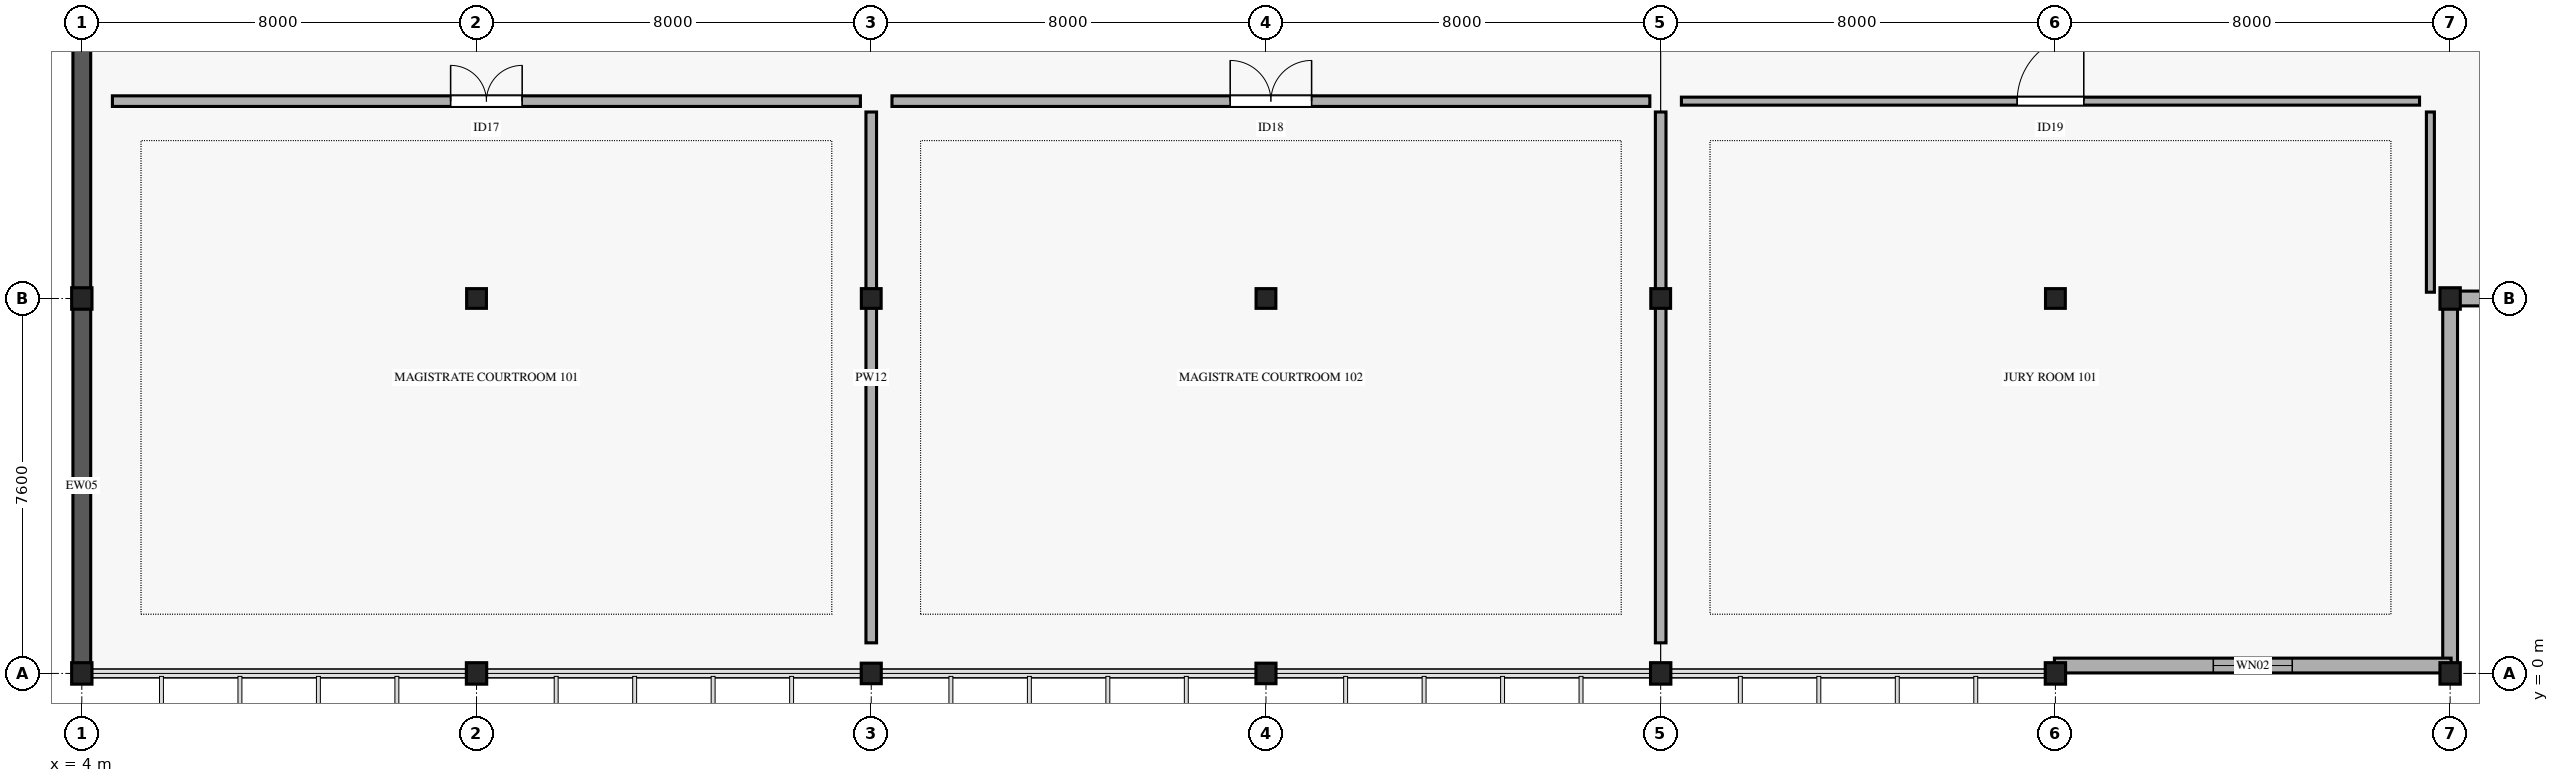
"""IFC4 building model, lengths in metres.
Left out: names, types, materials, properties, quantities, classifications, styles, units other than length and angle.
Written with IfcOpenShell. Run it as: python <this file> out.ifc"""

import sys

from ifc_helpers import new_model, si_unit, direction, frame, frame_2d, origin, origin_2d, place, context, subcontext, project, spatial, rectangle, i_section, extrude, element, fill, save


model = new_model("IFC4")
c1 = context("Model", 3, precision=1e-05, world=origin(), true_north=direction((0.0, 1.0)))
c2 = subcontext(c1, "Body", "Model", "MODEL_VIEW")
j1 = project(units=[si_unit("LENGTHUNIT", "METRE"), si_unit("PLANEANGLEUNIT", "RADIAN")], contexts=[c1])
p1 = place(None, origin())
s1 = spatial("IfcSite", under=j1, at=p1, CompositionType="ELEMENT")
p2 = place(p1, origin())
s2 = spatial("IfcBuilding", under=s1, at=p2, CompositionType="ELEMENT")
p3 = place(p2, frame((0.0, 0.0, 5.4)))
s3 = spatial("IfcBuildingStorey", under=s2, at=p3, CompositionType="ELEMENT", Elevation=5.4)
for number, where, z_axis, x_axis in (
    (1, (4.0, 0.0, 0.0), (0.0, 0.0, 1.0), (1.0, 0.0, 0.0)),
    (2, (4.0, 7.6, 0.0), (0.0, 0.0, 1.0), (1.0, 0.0, 0.0)),
    (3, (12.0, 0.0, 0.0), (0.0, 0.0, 1.0), (1.0, 0.0, 0.0)),
):
    element("IfcColumn", number, at=place(p3, frame(where, z_axis=z_axis, x_axis=x_axis)), inside=s3, PredefinedType="COLUMN", context=c2, shape_type="SweptSolid", body=[
        extrude(i_section(OverallWidth=0.412, OverallDepth=0.435, WebThickness=0.036, FlangeThickness=0.057, FilletRadius=0.015, at=origin_2d()), origin(), (0.0, 0.0, 1.0), 5.185),
    ])
p4 = place(p3, frame((12.0, 7.6, 0.0), z_axis=(0.0, 0.0, 1.0), x_axis=(1.0, 0.0, 0.0)))
e4 = element("IfcColumn", 4, at=p4, inside=s3, PredefinedType="COLUMN", context=c2, shape_type="SweptSolid", body=[
    extrude(i_section(OverallWidth=0.401, OverallDepth=0.399, WebThickness=0.025, FlangeThickness=0.04, FilletRadius=0.015, at=origin_2d()), origin(), (0.0, 0.0, 1.0), 5.185),
])
p5 = place(p3, frame((20.0, 0.0, 0.0), z_axis=(0.0, 0.0, 1.0), x_axis=(1.0, 0.0, 0.0)))
e5 = element("IfcColumn", 5, at=p5, inside=s3, PredefinedType="COLUMN", context=c2, shape_type="SweptSolid", body=[
    extrude(i_section(OverallWidth=0.406, OverallDepth=0.416, WebThickness=0.03, FlangeThickness=0.048, FilletRadius=0.015, at=origin_2d()), origin(), (0.0, 0.0, 1.0), 5.185),
])
p6 = place(p3, frame((20.0, 7.6, 0.0), z_axis=(0.0, 0.0, 1.0), x_axis=(1.0, 0.0, 0.0)))
e6 = element("IfcColumn", 6, at=p6, inside=s3, PredefinedType="COLUMN", context=c2, shape_type="SweptSolid", body=[
    extrude(i_section(OverallWidth=0.401, OverallDepth=0.399, WebThickness=0.025, FlangeThickness=0.04, FilletRadius=0.015, at=origin_2d()), origin(), (0.0, 0.0, 1.0), 5.185),
])
p7 = place(p3, frame((28.0, 0.0, 0.0), z_axis=(0.0, 0.0, 1.0), x_axis=(1.0, 0.0, 0.0)))
e7 = element("IfcColumn", 7, at=p7, inside=s3, PredefinedType="COLUMN", context=c2, shape_type="SweptSolid", body=[
    extrude(i_section(OverallWidth=0.406, OverallDepth=0.416, WebThickness=0.03, FlangeThickness=0.048, FilletRadius=0.015, at=origin_2d()), origin(), (0.0, 0.0, 1.0), 5.185),
])
p8 = place(p3, frame((28.0, 7.6, 0.0), z_axis=(0.0, 0.0, 1.0), x_axis=(1.0, 0.0, 0.0)))
e8 = element("IfcColumn", 8, at=p8, inside=s3, PredefinedType="COLUMN", context=c2, shape_type="SweptSolid", body=[
    extrude(i_section(OverallWidth=0.401, OverallDepth=0.399, WebThickness=0.025, FlangeThickness=0.04, FilletRadius=0.015, at=origin_2d()), origin(), (0.0, 0.0, 1.0), 5.185),
])
p9 = place(p3, frame((36.0, 0.0, 0.0), z_axis=(0.0, 0.0, 1.0), x_axis=(1.0, 0.0, 0.0)))
e9 = element("IfcColumn", 9, at=p9, inside=s3, PredefinedType="COLUMN", context=c2, shape_type="SweptSolid", body=[
    extrude(i_section(OverallWidth=0.412, OverallDepth=0.435, WebThickness=0.036, FlangeThickness=0.057, FilletRadius=0.015, at=origin_2d()), origin(), (0.0, 0.0, 1.0), 5.185),
])
p10 = place(p3, frame((36.0, 7.6, 0.0), z_axis=(0.0, 0.0, 1.0), x_axis=(1.0, 0.0, 0.0)))
e10 = element("IfcColumn", 10, at=p10, inside=s3, PredefinedType="COLUMN", context=c2, shape_type="SweptSolid", body=[
    extrude(i_section(OverallWidth=0.401, OverallDepth=0.399, WebThickness=0.025, FlangeThickness=0.04, FilletRadius=0.015, at=origin_2d()), origin(), (0.0, 0.0, 1.0), 5.185),
])
p11 = place(p3, frame((44.0, 0.0, 0.0), z_axis=(0.0, 0.0, 1.0), x_axis=(1.0, 0.0, 0.0)))
e11 = element("IfcColumn", 11, at=p11, inside=s3, PredefinedType="COLUMN", context=c2, shape_type="SweptSolid", body=[
    extrude(i_section(OverallWidth=0.412, OverallDepth=0.435, WebThickness=0.036, FlangeThickness=0.057, FilletRadius=0.015, at=origin_2d()), origin(), (0.0, 0.0, 1.0), 5.185),
])
p12 = place(p3, frame((44.0, 7.6, 0.0), z_axis=(0.0, 0.0, 1.0), x_axis=(1.0, 0.0, 0.0)))
e12 = element("IfcColumn", 12, at=p12, inside=s3, PredefinedType="COLUMN", context=c2, shape_type="SweptSolid", body=[
    extrude(i_section(OverallWidth=0.401, OverallDepth=0.399, WebThickness=0.025, FlangeThickness=0.04, FilletRadius=0.015, at=origin_2d()), origin(), (0.0, 0.0, 1.0), 5.185),
])
for number, where, z_axis, x_axis in (
    (13, (52.0, 0.0, 0.0), (0.0, 0.0, 1.0), (1.0, 0.0, 0.0)),
    (14, (52.0, 7.6, 0.0), (0.0, 0.0, 1.0), (1.0, 0.0, 0.0)),
):
    element("IfcColumn", number, at=place(p3, frame(where, z_axis=z_axis, x_axis=x_axis)), inside=s3, PredefinedType="COLUMN", context=c2, shape_type="SweptSolid", body=[
        extrude(i_section(OverallWidth=0.412, OverallDepth=0.435, WebThickness=0.036, FlangeThickness=0.057, FilletRadius=0.015, at=origin_2d()), origin(), (0.0, 0.0, 1.0), 5.185),
    ])
p13 = place(p3, frame((4.0, -0.02, 0.0), z_axis=(0.0, 0.0, 1.0), x_axis=(0.0, 1.0, 0.0)))
e15 = element("IfcWall", 15, at=p13, inside=s3, PredefinedType="STANDARD", context=c2, shape_type="SweptSolid", body=[
    extrude(rectangle(XDim=7.64, YDim=0.36, at=frame_2d((3.82, 0.0))), origin(), (0.0, 0.0, 1.0), 5.19),
])
p14 = place(p3, frame((4.0, 7.58, 0.0), z_axis=(0.0, 0.0, 1.0), x_axis=(0.0, 1.0, 0.0)))
e16 = element("IfcWall", 16, at=p14, inside=s3, PredefinedType="STANDARD", context=c2, shape_type="SweptSolid", body=[
    extrude(rectangle(XDim=7.64, YDim=0.36, at=frame_2d((3.82, 0.0))), origin(), (0.0, 0.0, 1.0), 5.19),
])
p15 = place(p3, frame((60.02, 7.6, 0.0), z_axis=(0.0, 0.0, 1.0), x_axis=(-1.0, 0.0, 0.0)))
e17 = element("IfcWall", 17, at=p15, inside=s3, PredefinedType="STANDARD", context=c2, shape_type="SweptSolid", body=[
    extrude(rectangle(XDim=8.04, YDim=0.3, at=frame_2d((4.02, 0.0))), origin(), (0.0, 0.0, 1.0), 4.25),
])
p16 = place(p3, frame((52.0, 7.62, 0.0), z_axis=(0.0, 0.0, 1.0), x_axis=(0.0, -1.0, 0.0)))
e18 = element("IfcWall", 18, at=p16, inside=s3, PredefinedType="STANDARD", context=c2, shape_type="SweptSolid", body=[
    extrude(rectangle(XDim=7.64, YDim=0.3, at=frame_2d((3.82, 0.0))), origin(), (0.0, 0.0, 1.0), 4.25),
])
p17 = place(p3, frame((52.02, 0.16, 0.0), z_axis=(0.0, 0.0, 1.0), x_axis=(-1.0, 0.0, 0.0)))
e19 = element("IfcWall", 19, at=p17, inside=s3, PredefinedType="STANDARD", context=c2, shape_type="SweptSolid", body=[
    extrude(rectangle(XDim=8.04, YDim=0.3, at=frame_2d((4.02, 0.0))), origin(), (0.0, 0.0, 1.0), 4.25),
])
p18 = place(p17, frame((3.22, 0.0, 0.75)))
e20 = element("IfcOpeningElement", 20, at=p18, cuts=e19, PredefinedType="OPENING", context=c2, shape_type="SweptSolid", body=[
    extrude(rectangle(XDim=1.6, YDim=2.0, at=frame_2d((0.8, 1.0))), frame((0.0, 0.16, 0.0), z_axis=(0.0, -1.0, 0.0), x_axis=(1.0, 0.0, 0.0)), (0.0, 0.0, 1.0), 0.32),
])
p19 = place(p3, frame((4.62, 11.6, 0.0), z_axis=(0.0, 0.0, 1.0), x_axis=(1.0, 0.0, 0.0)))
e21 = element("IfcWall", 21, at=p19, inside=s3, PredefinedType="PARTITIONING", context=c2, shape_type="SweptSolid", body=[
    extrude(rectangle(XDim=15.16, YDim=0.215, at=frame_2d((7.58, 0.0))), origin(), (0.0, 0.0, 1.0), 4.05),
])
p20 = place(p19, frame((6.855, 0.0, 0.0)))
e22 = element("IfcOpeningElement", 22, at=p20, cuts=e21, PredefinedType="OPENING", context=c2, shape_type="SweptSolid", body=[
    extrude(rectangle(XDim=1.45, YDim=2.25, at=frame_2d((0.725, 1.125))), frame((0.0, 0.117, 0.0), z_axis=(0.0, -1.0, 0.0), x_axis=(1.0, 0.0, 0.0)), (0.0, 0.0, 1.0), 0.235),
])
p21 = place(p3, frame((20.0, 0.62, 0.0), z_axis=(0.0, 0.0, 1.0), x_axis=(0.0, 1.0, 0.0)))
e23 = element("IfcWall", 23, at=p21, inside=s3, PredefinedType="PARTITIONING", context=c2, shape_type="SweptSolid", body=[
    extrude(rectangle(XDim=10.76, YDim=0.215, at=frame_2d((5.38, 0.0))), origin(), (0.0, 0.0, 1.0), 4.05),
])
p22 = place(p3, frame((20.42, 11.6, 0.0), z_axis=(0.0, 0.0, 1.0), x_axis=(1.0, 0.0, 0.0)))
e24 = element("IfcWall", 24, at=p22, inside=s3, PredefinedType="PARTITIONING", context=c2, shape_type="SweptSolid", body=[
    extrude(rectangle(XDim=15.36, YDim=0.215, at=frame_2d((7.68, 0.0))), origin(), (0.0, 0.0, 1.0), 4.05),
])
p23 = place(p22, frame((6.855, 0.0, 0.0)))
e25 = element("IfcOpeningElement", 25, at=p23, cuts=e24, PredefinedType="OPENING", context=c2, shape_type="SweptSolid", body=[
    extrude(rectangle(XDim=1.65, YDim=2.3, at=frame_2d((0.825, 1.15))), frame((0.0, 0.117, 0.0), z_axis=(0.0, -1.0, 0.0), x_axis=(1.0, 0.0, 0.0)), (0.0, 0.0, 1.0), 0.235),
])
p24 = place(p3, frame((36.0, 0.62, 0.0), z_axis=(0.0, 0.0, 1.0), x_axis=(0.0, 1.0, 0.0)))
e26 = element("IfcWall", 26, at=p24, inside=s3, PredefinedType="PARTITIONING", context=c2, shape_type="SweptSolid", body=[
    extrude(rectangle(XDim=10.76, YDim=0.215, at=frame_2d((5.38, 0.0))), origin(), (0.0, 0.0, 1.0), 4.05),
])
p25 = place(p3, frame((36.42, 11.6, 0.0), z_axis=(0.0, 0.0, 1.0), x_axis=(1.0, 0.0, 0.0)))
e27 = element("IfcWall", 27, at=p25, inside=s3, PredefinedType="PARTITIONING", context=c2, shape_type="SweptSolid", body=[
    extrude(rectangle(XDim=14.96, YDim=0.162, at=frame_2d((7.48, 0.0))), origin(), (0.0, 0.0, 1.0), 4.05),
])
p26 = place(p25, frame((6.805, 0.0, 0.0)))
e28 = element("IfcOpeningElement", 28, at=p26, cuts=e27, PredefinedType="OPENING", context=c2, shape_type="SweptSolid", body=[
    extrude(rectangle(XDim=1.35, YDim=2.25, at=frame_2d((0.675, 1.125))), frame((0.0, 0.091, 0.0), z_axis=(0.0, -1.0, 0.0), x_axis=(1.0, 0.0, 0.0)), (0.0, 0.0, 1.0), 0.182),
])
p27 = place(p3, frame((51.6, 7.727, 0.0), z_axis=(0.0, 0.0, 1.0), x_axis=(0.0, 1.0, 0.0)))
e29 = element("IfcWall", 29, at=p27, inside=s3, PredefinedType="PARTITIONING", context=c2, shape_type="SweptSolid", body=[
    extrude(rectangle(XDim=3.653, YDim=0.162, at=frame_2d((1.826, 0.0))), origin(), (0.0, 0.0, 1.0), 4.05),
])
p28 = place(p18, origin())
e30 = element("IfcWindow", 30, at=p28, inside=s3, PartitioningType="SINGLE_PANEL", PredefinedType="WINDOW", context=c2, shape_type="SweptSolid", body=[
    extrude(rectangle(XDim=1.6, YDim=2.0, at=frame_2d((0.8, 1.0))), frame((0.0, 0.03, 0.0), z_axis=(0.0, -1.0, 0.0), x_axis=(1.0, 0.0, 0.0)), (0.0, 0.0, 1.0), 0.06),
])
fill(e20, e30)
p29 = place(p20, origin())
e31 = element("IfcDoor", 31, at=p29, inside=s3, OperationType="DOUBLE_DOOR_SINGLE_SWING", PredefinedType="DOOR", context=c2, shape_type="SweptSolid", body=[
    extrude(rectangle(XDim=1.45, YDim=2.25, at=frame_2d((0.725, 1.125))), frame((0.0, 0.025, 0.0), z_axis=(0.0, -1.0, 0.0), x_axis=(1.0, 0.0, 0.0)), (0.0, 0.0, 1.0), 0.05),
])
fill(e22, e31)
p30 = place(p23, origin())
e32 = element("IfcDoor", 32, at=p30, inside=s3, OperationType="DOUBLE_DOOR_SINGLE_SWING", PredefinedType="DOOR", context=c2, shape_type="SweptSolid", body=[
    extrude(rectangle(XDim=1.65, YDim=2.3, at=frame_2d((0.825, 1.15))), frame((0.0, 0.025, 0.0), z_axis=(0.0, -1.0, 0.0), x_axis=(1.0, 0.0, 0.0)), (0.0, 0.0, 1.0), 0.05),
])
fill(e25, e32)
p31 = place(p26, origin())
e33 = element("IfcDoor", 33, at=p31, inside=s3, OperationType="SINGLE_SWING_RIGHT", PredefinedType="DOOR", context=c2, shape_type="SweptSolid", body=[
    extrude(rectangle(XDim=1.35, YDim=2.25, at=frame_2d((0.675, 1.125))), frame((0.0, 0.025, 0.0), z_axis=(0.0, -1.0, 0.0), x_axis=(1.0, 0.0, 0.0)), (0.0, 0.0, 1.0), 0.05),
])
fill(e28, e33)
save(model, sys.argv[1])
